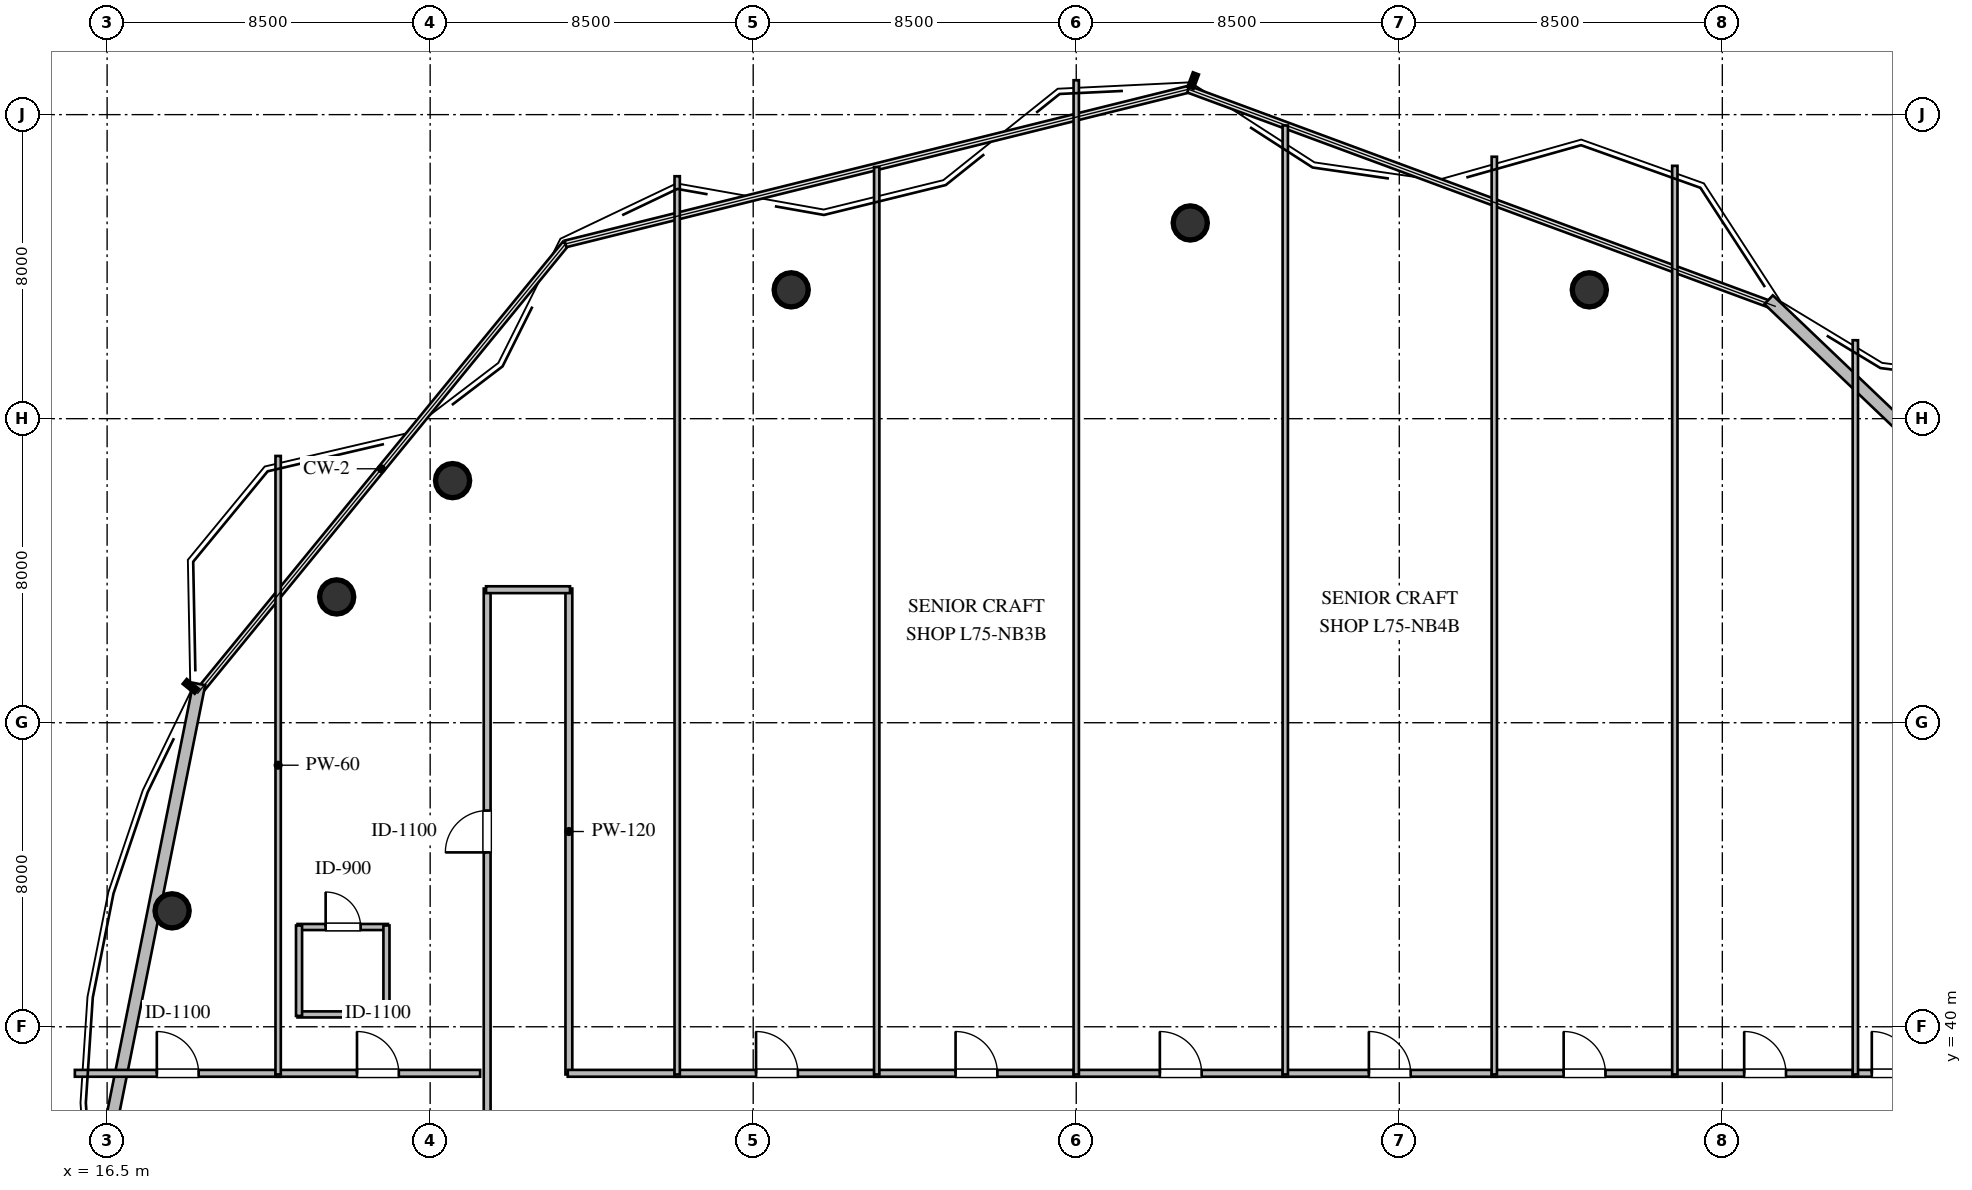
"""IFC4 building model, lengths in metres.
Left out: names, types, materials, properties, quantities, classifications, styles, units other than length and angle.
Written with IfcOpenShell. Run it as: python <this file> out.ifc"""

import sys

from ifc_helpers import new_model, si_unit, direction, frame, frame_2d, origin, origin_2d, place, context, subcontext, project, spatial, rectangle, circle, extrude, element, fill, save


model = new_model("IFC4")
c1 = context("Model", 3, precision=1e-05, world=origin(), true_north=direction((0.0, 1.0)))
c2 = subcontext(c1, "Body", "Model", "MODEL_VIEW")
j1 = project(units=[si_unit("LENGTHUNIT", "METRE"), si_unit("PLANEANGLEUNIT", "RADIAN")], contexts=[c1])
p1 = place(None, origin())
s1 = spatial("IfcSite", under=j1, at=p1, CompositionType="ELEMENT")
p2 = place(p1, origin())
s2 = spatial("IfcBuilding", under=s1, at=p2, CompositionType="ELEMENT")
p3 = place(p2, frame((0.0, 0.0, 285.2)))
s3 = spatial("IfcBuildingStorey", under=s2, at=p3, CompositionType="ELEMENT", Elevation=285.2)
for number, where, z_axis, x_axis in (
    (1, (55.5, 59.39, 0.0), (0.0, 0.0, 1.0), (1.0, 0.0, 0.0)),
    (2, (45.0, 61.15, 0.0), (0.0, 0.0, 1.0), (1.0, 0.0, 0.0)),
    (3, (34.5, 59.39, 0.0), (0.0, 0.0, 1.0), (1.0, 0.0, 0.0)),
    (4, (25.59, 54.37, 0.0), (0.0, 0.0, 1.0), (1.0, 0.0, 0.0)),
    (5, (22.54, 51.31, 0.0), (0.0, 0.0, 1.0), (1.0, 0.0, 0.0)),
    (6, (18.21, 43.05, 0.0), (0.0, 0.0, 1.0), (1.0, 0.0, 0.0)),
):
    element("IfcColumn", number, at=place(p3, frame(where, z_axis=z_axis, x_axis=x_axis)), inside=s3, PredefinedType="COLUMN", context=c2, shape_type="SweptSolid", body=[
        extrude(circle(Radius=0.45, at=origin_2d()), origin(), (0.0, 0.0, 1.0), 3.8),
    ])
p4 = place(p3, frame((16.111, 34.999, 0.0), z_axis=(0.0, 0.0, 1.0), x_axis=(0.196720235208, 0.980459662128, 0.0)))
e7 = element("IfcWall", 7, at=p4, inside=s3, PredefinedType="STANDARD", context=c2, shape_type="SweptSolid", body=[
    extrude(rectangle(XDim=14.299, YDim=0.32, at=frame_2d((7.15, 0.0))), origin(), (0.0, 0.0, 1.0), 3.56),
])
p5 = place(p3, frame((60.219, 59.13, 0.0), z_axis=(0.0, 0.0, 1.0), x_axis=(0.723493659852, -0.690331025056, 0.0)))
e8 = element("IfcWall", 8, at=p5, inside=s3, PredefinedType="STANDARD", context=c2, shape_type="SweptSolid", body=[
    extrude(rectangle(XDim=15.408, YDim=0.32, at=frame_2d((7.704, 0.0))), origin(), (0.0, 0.0, 1.0), 3.56),
])
p6 = place(p3, frame((21.51, 40.325, 0.0), z_axis=(0.0, 0.0, 1.0), x_axis=(1.0, 0.0, 0.0)))
e9 = element("IfcWall", 9, at=p6, inside=s3, PredefinedType="PLUMBINGWALL", context=c2, shape_type="SweptSolid", body=[
    extrude(rectangle(XDim=2.38, YDim=0.16, at=frame_2d((1.19, 0.0))), origin(), (0.0, 0.0, 1.0), 3.56),
])
p7 = place(p3, frame((21.51, 42.625, 0.0), z_axis=(0.0, 0.0, 1.0), x_axis=(1.0, 0.0, 0.0)))
e10 = element("IfcWall", 10, at=p7, inside=s3, PredefinedType="PLUMBINGWALL", context=c2, shape_type="SweptSolid", body=[
    extrude(rectangle(XDim=2.38, YDim=0.16, at=frame_2d((1.19, 0.0))), origin(), (0.0, 0.0, 1.0), 3.56),
])
p8 = place(p7, frame((0.74, 0.0, 0.0)))
e11 = element("IfcOpeningElement", 11, at=p8, cuts=e10, PredefinedType="OPENING", context=c2, shape_type="SweptSolid", body=[
    extrude(rectangle(XDim=0.92, YDim=2.1, at=frame_2d((0.46, 1.05))), frame((0.0, 0.09, 0.0), z_axis=(0.0, -1.0, 0.0), x_axis=(1.0, 0.0, 0.0)), (0.0, 0.0, 1.0), 0.18),
])
for number, where, z_axis, x_axis in (
    (12, (21.55, 40.285, 0.0), (0.0, 0.0, 1.0), (0.0, 1.0, 0.0)),
    (13, (23.85, 40.285, 0.0), (0.0, 0.0, 1.0), (0.0, 1.0, 0.0)),
):
    element("IfcWall", number, at=place(p3, frame(where, z_axis=z_axis, x_axis=x_axis)), inside=s3, PredefinedType="PLUMBINGWALL", context=c2, shape_type="SweptSolid", body=[
        extrude(rectangle(XDim=2.38, YDim=0.16, at=frame_2d((1.19, 0.0))), origin(), (0.0, 0.0, 1.0), 3.09),
    ])
p9 = place(p3, frame((15.651, 38.775, 0.0), z_axis=(0.0, 0.0, 1.0), x_axis=(1.0, 0.0, 0.0)))
e14 = element("IfcWall", 14, at=p9, inside=s3, PredefinedType="PARTITIONING", context=c2, shape_type="SweptSolid", body=[
    extrude(rectangle(XDim=5.414, YDim=0.18, at=frame_2d((2.707, 0.0))), origin(), (0.0, 0.0, 1.0), 3.56),
])
p10 = place(p9, frame((2.157, 0.0, 0.0)))
e15 = element("IfcOpeningElement", 15, at=p10, cuts=e14, PredefinedType="OPENING", context=c2, shape_type="SweptSolid", body=[
    extrude(rectangle(XDim=1.1, YDim=2.1, at=frame_2d((0.55, 1.05))), frame((0.0, 0.1, 0.0), z_axis=(0.0, -1.0, 0.0), x_axis=(1.0, 0.0, 0.0)), (0.0, 0.0, 1.0), 0.2),
])
p11 = place(p3, frame((20.935, 38.775, 0.0), z_axis=(0.0, 0.0, 1.0), x_axis=(1.0, 0.0, 0.0)))
e16 = element("IfcWall", 16, at=p11, inside=s3, PredefinedType="PARTITIONING", context=c2, shape_type="SweptSolid", body=[
    extrude(rectangle(XDim=5.38, YDim=0.18, at=frame_2d((2.69, 0.0))), origin(), (0.0, 0.0, 1.0), 3.56),
])
p12 = place(p11, frame((2.14, 0.0, 0.0)))
e17 = element("IfcOpeningElement", 17, at=p12, cuts=e16, PredefinedType="OPENING", context=c2, shape_type="SweptSolid", body=[
    extrude(rectangle(XDim=1.1, YDim=2.1, at=frame_2d((0.55, 1.05))), frame((0.0, 0.1, 0.0), z_axis=(0.0, -1.0, 0.0), x_axis=(1.0, 0.0, 0.0)), (0.0, 0.0, 1.0), 0.2),
])
p13 = place(p3, frame((26.5, 36.41, 0.0), z_axis=(0.0, 0.0, 1.0), x_axis=(0.0, 1.0, 0.0)))
e18 = element("IfcWall", 18, at=p13, inside=s3, PredefinedType="PARTITIONING", context=c2, shape_type="SweptSolid", body=[
    extrude(rectangle(XDim=15.12, YDim=0.18, at=frame_2d((7.56, 0.0))), origin(), (0.0, 0.0, 1.0), 3.56),
])
p14 = place(p13, frame((8.178, 0.0, 0.0)))
e19 = element("IfcOpeningElement", 19, at=p14, cuts=e18, PredefinedType="OPENING", context=c2, shape_type="SweptSolid", body=[
    extrude(rectangle(XDim=1.1, YDim=2.1, at=frame_2d((0.55, 1.05))), frame((0.0, 0.1, 0.0), z_axis=(0.0, -1.0, 0.0), x_axis=(1.0, 0.0, 0.0)), (0.0, 0.0, 1.0), 0.2),
])
p15 = place(p3, frame((28.65, 51.53, 0.0), z_axis=(0.0, 0.0, 1.0), x_axis=(0.0, -1.0, 0.0)))
e20 = element("IfcWall", 20, at=p15, inside=s3, PredefinedType="PARTITIONING", context=c2, shape_type="SweptSolid", body=[
    extrude(rectangle(XDim=12.785, YDim=0.18, at=frame_2d((6.393, 0.0))), origin(), (0.0, 0.0, 1.0), 3.56),
])
p16 = place(p3, frame((28.62, 38.775, 0.0), z_axis=(0.0, 0.0, 1.0), x_axis=(1.0, 0.0, 0.0)))
e21 = element("IfcWall", 21, at=p16, inside=s3, PredefinedType="PARTITIONING", context=c2, shape_type="SweptSolid", body=[
    extrude(rectangle(XDim=2.945, YDim=0.18, at=frame_2d((1.472, 0.0))), origin(), (0.0, 0.0, 1.0), 3.56),
])
p17 = place(p3, frame((26.47, 51.5, 0.0), z_axis=(0.0, 0.0, 1.0), x_axis=(1.0, 0.0, 0.0)))
e22 = element("IfcWall", 22, at=p17, inside=s3, PredefinedType="PARTITIONING", context=c2, shape_type="SweptSolid", body=[
    extrude(rectangle(XDim=2.21, YDim=0.18, at=frame_2d((1.105, 0.0))), origin(), (0.0, 0.0, 1.0), 3.56),
])
p18 = place(p3, frame((31.435, 38.775, 0.0), z_axis=(0.0, 0.0, 1.0), x_axis=(1.0, 0.0, 0.0)))
e23 = element("IfcWall", 23, at=p18, inside=s3, PredefinedType="PARTITIONING", context=c2, shape_type="SweptSolid", body=[
    extrude(rectangle(XDim=5.38, YDim=0.18, at=frame_2d((2.69, 0.0))), origin(), (0.0, 0.0, 1.0), 3.56),
])
p19 = place(p18, frame((2.14, 0.0, 0.0)))
e24 = element("IfcOpeningElement", 24, at=p19, cuts=e23, PredefinedType="OPENING", context=c2, shape_type="SweptSolid", body=[
    extrude(rectangle(XDim=1.1, YDim=2.1, at=frame_2d((0.55, 1.05))), frame((0.0, 0.1, 0.0), z_axis=(0.0, -1.0, 0.0), x_axis=(1.0, 0.0, 0.0)), (0.0, 0.0, 1.0), 0.2),
])
p20 = place(p3, frame((36.685, 38.775, 0.0), z_axis=(0.0, 0.0, 1.0), x_axis=(1.0, 0.0, 0.0)))
e25 = element("IfcWall", 25, at=p20, inside=s3, PredefinedType="PARTITIONING", context=c2, shape_type="SweptSolid", body=[
    extrude(rectangle(XDim=5.38, YDim=0.18, at=frame_2d((2.69, 0.0))), origin(), (0.0, 0.0, 1.0), 3.56),
])
p21 = place(p20, frame((2.14, 0.0, 0.0)))
e26 = element("IfcOpeningElement", 26, at=p21, cuts=e25, PredefinedType="OPENING", context=c2, shape_type="SweptSolid", body=[
    extrude(rectangle(XDim=1.1, YDim=2.1, at=frame_2d((0.55, 1.05))), frame((0.0, 0.1, 0.0), z_axis=(0.0, -1.0, 0.0), x_axis=(1.0, 0.0, 0.0)), (0.0, 0.0, 1.0), 0.2),
])
p22 = place(p3, frame((41.935, 38.775, 0.0), z_axis=(0.0, 0.0, 1.0), x_axis=(1.0, 0.0, 0.0)))
e27 = element("IfcWall", 27, at=p22, inside=s3, PredefinedType="PARTITIONING", context=c2, shape_type="SweptSolid", body=[
    extrude(rectangle(XDim=5.63, YDim=0.18, at=frame_2d((2.815, 0.0))), origin(), (0.0, 0.0, 1.0), 3.56),
])
p23 = place(p22, frame((2.265, 0.0, 0.0)))
e28 = element("IfcOpeningElement", 28, at=p23, cuts=e27, PredefinedType="OPENING", context=c2, shape_type="SweptSolid", body=[
    extrude(rectangle(XDim=1.1, YDim=2.1, at=frame_2d((0.55, 1.05))), frame((0.0, 0.1, 0.0), z_axis=(0.0, -1.0, 0.0), x_axis=(1.0, 0.0, 0.0)), (0.0, 0.0, 1.0), 0.2),
])
p24 = place(p3, frame((47.435, 38.775, 0.0), z_axis=(0.0, 0.0, 1.0), x_axis=(1.0, 0.0, 0.0)))
e29 = element("IfcWall", 29, at=p24, inside=s3, PredefinedType="PARTITIONING", context=c2, shape_type="SweptSolid", body=[
    extrude(rectangle(XDim=5.63, YDim=0.18, at=frame_2d((2.815, 0.0))), origin(), (0.0, 0.0, 1.0), 3.56),
])
p25 = place(p24, frame((2.265, 0.0, 0.0)))
e30 = element("IfcOpeningElement", 30, at=p25, cuts=e29, PredefinedType="OPENING", context=c2, shape_type="SweptSolid", body=[
    extrude(rectangle(XDim=1.1, YDim=2.1, at=frame_2d((0.55, 1.05))), frame((0.0, 0.1, 0.0), z_axis=(0.0, -1.0, 0.0), x_axis=(1.0, 0.0, 0.0)), (0.0, 0.0, 1.0), 0.2),
])
p26 = place(p3, frame((52.935, 38.775, 0.0), z_axis=(0.0, 0.0, 1.0), x_axis=(1.0, 0.0, 0.0)))
e31 = element("IfcWall", 31, at=p26, inside=s3, PredefinedType="PARTITIONING", context=c2, shape_type="SweptSolid", body=[
    extrude(rectangle(XDim=4.88, YDim=0.18, at=frame_2d((2.44, 0.0))), origin(), (0.0, 0.0, 1.0), 3.56),
])
p27 = place(p26, frame((1.89, 0.0, 0.0)))
e32 = element("IfcOpeningElement", 32, at=p27, cuts=e31, PredefinedType="OPENING", context=c2, shape_type="SweptSolid", body=[
    extrude(rectangle(XDim=1.1, YDim=2.1, at=frame_2d((0.55, 1.05))), frame((0.0, 0.1, 0.0), z_axis=(0.0, -1.0, 0.0), x_axis=(1.0, 0.0, 0.0)), (0.0, 0.0, 1.0), 0.2),
])
p28 = place(p3, frame((57.685, 38.775, 0.0), z_axis=(0.0, 0.0, 1.0), x_axis=(1.0, 0.0, 0.0)))
e33 = element("IfcWall", 33, at=p28, inside=s3, PredefinedType="PARTITIONING", context=c2, shape_type="SweptSolid", body=[
    extrude(rectangle(XDim=4.88, YDim=0.18, at=frame_2d((2.44, 0.0))), origin(), (0.0, 0.0, 1.0), 3.56),
])
p29 = place(p28, frame((1.89, 0.0, 0.0)))
e34 = element("IfcOpeningElement", 34, at=p29, cuts=e33, PredefinedType="OPENING", context=c2, shape_type="SweptSolid", body=[
    extrude(rectangle(XDim=1.1, YDim=2.1, at=frame_2d((0.55, 1.05))), frame((0.0, 0.1, 0.0), z_axis=(0.0, -1.0, 0.0), x_axis=(1.0, 0.0, 0.0)), (0.0, 0.0, 1.0), 0.2),
])
p30 = place(p3, frame((62.435, 38.775, 0.0), z_axis=(0.0, 0.0, 1.0), x_axis=(1.0, 0.0, 0.0)))
e35 = element("IfcWall", 35, at=p30, inside=s3, PredefinedType="PARTITIONING", context=c2, shape_type="SweptSolid", body=[
    extrude(rectangle(XDim=2.095, YDim=0.18, at=frame_2d((1.047, 0.0))), origin(), (0.0, 0.0, 1.0), 3.56),
])
p31 = place(p30, frame((0.498, 0.0, 0.0)))
e36 = element("IfcOpeningElement", 36, at=p31, cuts=e35, PredefinedType="OPENING", context=c2, shape_type="SweptSolid", body=[
    extrude(rectangle(XDim=1.1, YDim=2.1, at=frame_2d((0.55, 1.05))), frame((0.0, 0.1, 0.0), z_axis=(0.0, -1.0, 0.0), x_axis=(1.0, 0.0, 0.0)), (0.0, 0.0, 1.0), 0.2),
])
p32 = place(p3, frame((21.0, 55.019, 0.0), z_axis=(0.0, 0.0, 1.0), x_axis=(0.0, -1.0, 0.0)))
e37 = element("IfcWall", 37, at=p32, inside=s3, PredefinedType="PARTITIONING", context=c2, shape_type="SweptSolid", body=[
    extrude(rectangle(XDim=16.274, YDim=0.14, at=frame_2d((8.137, 0.0))), origin(), (0.0, 0.0, 1.0), 3.56),
])
p33 = place(p3, frame((31.5, 62.379, 0.0), z_axis=(0.0, 0.0, 1.0), x_axis=(0.0, -1.0, 0.0)))
e38 = element("IfcWall", 38, at=p33, inside=s3, PredefinedType="PARTITIONING", context=c2, shape_type="SweptSolid", body=[
    extrude(rectangle(XDim=23.634, YDim=0.14, at=frame_2d((11.817, 0.0))), origin(), (0.0, 0.0, 1.0), 3.56),
])
p34 = place(p3, frame((36.75, 62.622, 0.0), z_axis=(0.0, 0.0, 1.0), x_axis=(0.0, -1.0, 0.0)))
e39 = element("IfcWall", 39, at=p34, inside=s3, PredefinedType="PARTITIONING", context=c2, shape_type="SweptSolid", body=[
    extrude(rectangle(XDim=23.876, YDim=0.14, at=frame_2d((11.938, 0.0))), origin(), (0.0, 0.0, 1.0), 3.56),
])
p35 = place(p3, frame((42.0, 64.905, 0.0), z_axis=(0.0, 0.0, 1.0), x_axis=(0.0, -1.0, 0.0)))
e40 = element("IfcWall", 40, at=p35, inside=s3, PredefinedType="PARTITIONING", context=c2, shape_type="SweptSolid", body=[
    extrude(rectangle(XDim=26.16, YDim=0.14, at=frame_2d((13.08, 0.0))), origin(), (0.0, 0.0, 1.0), 3.56),
])
p36 = place(p3, frame((47.5, 63.714, 0.0), z_axis=(0.0, 0.0, 1.0), x_axis=(0.0, -1.0, 0.0)))
e41 = element("IfcWall", 41, at=p36, inside=s3, PredefinedType="PARTITIONING", context=c2, shape_type="SweptSolid", body=[
    extrude(rectangle(XDim=24.969, YDim=0.14, at=frame_2d((12.485, 0.0))), origin(), (0.0, 0.0, 1.0), 3.56),
])
p37 = place(p3, frame((53.0, 62.892, 0.0), z_axis=(0.0, 0.0, 1.0), x_axis=(0.0, -1.0, 0.0)))
e42 = element("IfcWall", 42, at=p37, inside=s3, PredefinedType="PARTITIONING", context=c2, shape_type="SweptSolid", body=[
    extrude(rectangle(XDim=24.147, YDim=0.14, at=frame_2d((12.073, 0.0))), origin(), (0.0, 0.0, 1.0), 3.56),
])
p38 = place(p3, frame((57.75, 62.653, 0.0), z_axis=(0.0, 0.0, 1.0), x_axis=(0.0, -1.0, 0.0)))
e43 = element("IfcWall", 43, at=p38, inside=s3, PredefinedType="PARTITIONING", context=c2, shape_type="SweptSolid", body=[
    extrude(rectangle(XDim=23.908, YDim=0.14, at=frame_2d((11.954, 0.0))), origin(), (0.0, 0.0, 1.0), 3.56),
])
p39 = place(p3, frame((62.5, 58.064, 0.0), z_axis=(0.0, 0.0, 1.0), x_axis=(0.0, -1.0, 0.0)))
e44 = element("IfcWall", 44, at=p39, inside=s3, PredefinedType="PARTITIONING", context=c2, shape_type="SweptSolid", body=[
    extrude(rectangle(XDim=19.319, YDim=0.14, at=frame_2d((9.659, 0.0))), origin(), (0.0, 0.0, 1.0), 3.56),
])
p40 = place(p8, origin())
e45 = element("IfcDoor", 45, at=p40, inside=s3, OperationType="SINGLE_SWING_LEFT", PredefinedType="DOOR", context=c2, shape_type="SweptSolid", body=[
    extrude(rectangle(XDim=0.92, YDim=2.1, at=frame_2d((0.46, 1.05))), frame((0.0, 0.025, 0.0), z_axis=(0.0, -1.0, 0.0), x_axis=(1.0, 0.0, 0.0)), (0.0, 0.0, 1.0), 0.05),
])
fill(e11, e45)
p41 = place(p10, origin())
e46 = element("IfcDoor", 46, at=p41, inside=s3, OperationType="SINGLE_SWING_LEFT", PredefinedType="DOOR", context=c2, shape_type="SweptSolid", body=[
    extrude(rectangle(XDim=1.1, YDim=2.1, at=frame_2d((0.55, 1.05))), frame((0.0, 0.025, 0.0), z_axis=(0.0, -1.0, 0.0), x_axis=(1.0, 0.0, 0.0)), (0.0, 0.0, 1.0), 0.05),
])
fill(e15, e46)
p42 = place(p12, origin())
e47 = element("IfcDoor", 47, at=p42, inside=s3, OperationType="SINGLE_SWING_LEFT", PredefinedType="DOOR", context=c2, shape_type="SweptSolid", body=[
    extrude(rectangle(XDim=1.1, YDim=2.1, at=frame_2d((0.55, 1.05))), frame((0.0, 0.025, 0.0), z_axis=(0.0, -1.0, 0.0), x_axis=(1.0, 0.0, 0.0)), (0.0, 0.0, 1.0), 0.05),
])
fill(e17, e47)
p43 = place(p14, origin())
e48 = element("IfcDoor", 48, at=p43, inside=s3, OperationType="SINGLE_SWING_LEFT", PredefinedType="DOOR", context=c2, shape_type="SweptSolid", body=[
    extrude(rectangle(XDim=1.1, YDim=2.1, at=frame_2d((0.55, 1.05))), frame((0.0, 0.025, 0.0), z_axis=(0.0, -1.0, 0.0), x_axis=(1.0, 0.0, 0.0)), (0.0, 0.0, 1.0), 0.05),
])
fill(e19, e48)
p44 = place(p19, origin())
e49 = element("IfcDoor", 49, at=p44, inside=s3, OperationType="SINGLE_SWING_LEFT", PredefinedType="DOOR", context=c2, shape_type="SweptSolid", body=[
    extrude(rectangle(XDim=1.1, YDim=2.1, at=frame_2d((0.55, 1.05))), frame((0.0, 0.025, 0.0), z_axis=(0.0, -1.0, 0.0), x_axis=(1.0, 0.0, 0.0)), (0.0, 0.0, 1.0), 0.05),
])
fill(e24, e49)
p45 = place(p21, origin())
e50 = element("IfcDoor", 50, at=p45, inside=s3, OperationType="SINGLE_SWING_LEFT", PredefinedType="DOOR", context=c2, shape_type="SweptSolid", body=[
    extrude(rectangle(XDim=1.1, YDim=2.1, at=frame_2d((0.55, 1.05))), frame((0.0, 0.025, 0.0), z_axis=(0.0, -1.0, 0.0), x_axis=(1.0, 0.0, 0.0)), (0.0, 0.0, 1.0), 0.05),
])
fill(e26, e50)
p46 = place(p23, origin())
e51 = element("IfcDoor", 51, at=p46, inside=s3, OperationType="SINGLE_SWING_LEFT", PredefinedType="DOOR", context=c2, shape_type="SweptSolid", body=[
    extrude(rectangle(XDim=1.1, YDim=2.1, at=frame_2d((0.55, 1.05))), frame((0.0, 0.025, 0.0), z_axis=(0.0, -1.0, 0.0), x_axis=(1.0, 0.0, 0.0)), (0.0, 0.0, 1.0), 0.05),
])
fill(e28, e51)
p47 = place(p25, origin())
e52 = element("IfcDoor", 52, at=p47, inside=s3, OperationType="SINGLE_SWING_LEFT", PredefinedType="DOOR", context=c2, shape_type="SweptSolid", body=[
    extrude(rectangle(XDim=1.1, YDim=2.1, at=frame_2d((0.55, 1.05))), frame((0.0, 0.025, 0.0), z_axis=(0.0, -1.0, 0.0), x_axis=(1.0, 0.0, 0.0)), (0.0, 0.0, 1.0), 0.05),
])
fill(e30, e52)
p48 = place(p27, origin())
e53 = element("IfcDoor", 53, at=p48, inside=s3, OperationType="SINGLE_SWING_LEFT", PredefinedType="DOOR", context=c2, shape_type="SweptSolid", body=[
    extrude(rectangle(XDim=1.1, YDim=2.1, at=frame_2d((0.55, 1.05))), frame((0.0, 0.025, 0.0), z_axis=(0.0, -1.0, 0.0), x_axis=(1.0, 0.0, 0.0)), (0.0, 0.0, 1.0), 0.05),
])
fill(e32, e53)
p49 = place(p29, origin())
e54 = element("IfcDoor", 54, at=p49, inside=s3, OperationType="SINGLE_SWING_LEFT", PredefinedType="DOOR", context=c2, shape_type="SweptSolid", body=[
    extrude(rectangle(XDim=1.1, YDim=2.1, at=frame_2d((0.55, 1.05))), frame((0.0, 0.025, 0.0), z_axis=(0.0, -1.0, 0.0), x_axis=(1.0, 0.0, 0.0)), (0.0, 0.0, 1.0), 0.05),
])
fill(e34, e54)
p50 = place(p31, origin())
e55 = element("IfcDoor", 55, at=p50, inside=s3, OperationType="SINGLE_SWING_LEFT", PredefinedType="DOOR", context=c2, shape_type="SweptSolid", body=[
    extrude(rectangle(XDim=1.1, YDim=2.1, at=frame_2d((0.55, 1.05))), frame((0.0, 0.025, 0.0), z_axis=(0.0, -1.0, 0.0), x_axis=(1.0, 0.0, 0.0)), (0.0, 0.0, 1.0), 0.05),
])
fill(e36, e55)
save(model, sys.argv[1])
